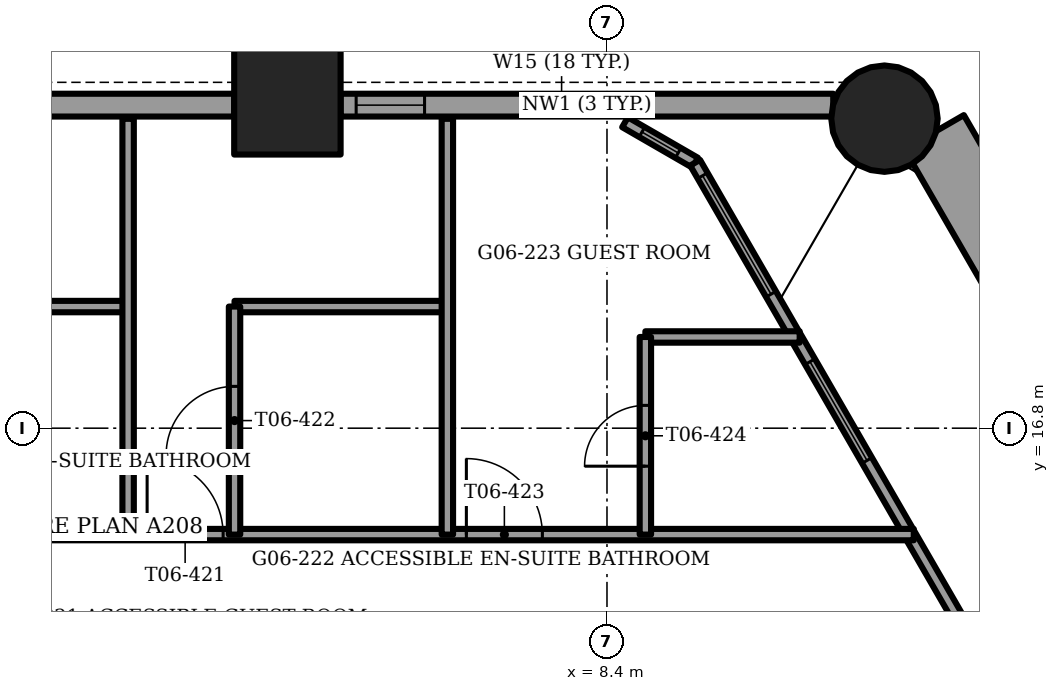
"""IFC4 building model, lengths in metres.
Left out: names, types, materials, properties, quantities, classifications, styles, units other than length and angle.
Written with IfcOpenShell. Run it as: python <this file> out.ifc"""

import sys

from ifc_helpers import new_model, si_unit, direction, frame, frame_2d, origin, origin_2d, place, context, subcontext, project, spatial, rectangle, circle, extrude, element, fill, save


model = new_model("IFC4")
c1 = context("Model", 3, precision=1e-05, world=origin(), true_north=direction((0.0, 1.0)))
c2 = subcontext(c1, "Body", "Model", "MODEL_VIEW")
j1 = project(units=[si_unit("LENGTHUNIT", "METRE"), si_unit("PLANEANGLEUNIT", "RADIAN")], contexts=[c1])
p1 = place(None, origin())
s1 = spatial("IfcSite", under=j1, at=p1, CompositionType="ELEMENT")
p2 = place(p1, origin())
s2 = spatial("IfcBuilding", under=s1, at=p2, CompositionType="ELEMENT")
p3 = place(p2, frame((0.0, 0.0, 28.0)))
s3 = spatial("IfcBuildingStorey", under=s2, at=p3, CompositionType="ELEMENT", Elevation=28.0)
p4 = place(p3, frame((12.051, 20.872, -1.2), z_axis=(0.0, 0.0, 1.0), x_axis=(1.0, 0.0, 0.0)))
e1 = element("IfcColumn", 1, at=p4, inside=s3, PredefinedType="COLUMN", context=c2, shape_type="SweptSolid", body=[
    extrude(circle(Radius=0.7, at=origin_2d()), origin(), (0.0, 0.0, 1.0), 3.75),
])
p5 = place(p3, frame((4.195, 21.1, -1.2), z_axis=(0.0, 0.0, 1.0), x_axis=(1.0, 0.0, 0.0)))
e2 = element("IfcColumn", 2, at=p5, inside=s3, PredefinedType="COLUMN", context=c2, shape_type="SweptSolid", body=[
    extrude(rectangle(XDim=1.4, YDim=1.4, at=origin_2d()), origin(), (0.0, 0.0, 1.0), 3.75),
])
p6 = place(p3, frame((16.057, 14.889, 0.0), z_axis=(0.0, 0.0, 1.0), x_axis=(-0.500005133765, 0.866022439784, 0.0)))
e3 = element("IfcWall", 3, at=p6, inside=s3, PredefinedType="PARAPET", context=c2, shape_type="SweptSolid", body=[
    extrude(rectangle(XDim=6.704, YDim=0.9, at=frame_2d((3.352, 0.0))), origin(), (0.0, 0.0, 1.0), 1.1),
])
p7 = place(p3, frame((11.377, 21.05, 0.0), z_axis=(0.0, 0.0, 1.0), x_axis=(-1.0, 0.0, 0.0)))
e4 = element("IfcWall", 4, at=p7, inside=s3, PredefinedType="SOLIDWALL", context=c2, shape_type="SweptSolid", body=[
    extrude(rectangle(XDim=6.481, YDim=0.3, at=frame_2d((3.241, 0.0))), origin(), (0.0, 0.0, 1.0), 2.55),
])
p8 = place(p7, frame((3.124, 0.0, 0.15)))
e5 = element("IfcOpeningElement", 5, at=p8, cuts=e4, PredefinedType="OPENING", context=c2, shape_type="SweptSolid", body=[
    extrude(rectangle(XDim=0.9, YDim=2.15, at=frame_2d((0.45, 1.075))), frame((0.0, 0.15, 0.0), z_axis=(0.0, -1.0, 0.0), x_axis=(1.0, 0.0, 0.0)), (0.0, 0.0, 1.0), 0.3),
])
p9 = place(p7, frame((5.377, 0.0, 0.15)))
e6 = element("IfcOpeningElement", 6, at=p9, cuts=e4, PredefinedType="OPENING", context=c2, shape_type="SweptSolid", body=[
    extrude(rectangle(XDim=0.9, YDim=2.15, at=frame_2d((0.45, 1.075))), frame((0.0, 0.15, 0.0), z_axis=(0.0, -1.0, 0.0), x_axis=(1.0, 0.0, 0.0)), (0.0, 0.0, 1.0), 0.3),
])
p10 = place(p3, frame((3.495, 21.05, 0.0), z_axis=(0.0, 0.0, 1.0), x_axis=(-1.0, 0.0, 0.0)))
e7 = element("IfcWall", 7, at=p10, inside=s3, PredefinedType="SOLIDWALL", context=c2, shape_type="SweptSolid", body=[
    extrude(rectangle(XDim=6.991, YDim=0.3, at=frame_2d((3.495, 0.0))), origin(), (0.0, 0.0, 1.0), 2.55),
])
p11 = place(p10, frame((3.095, 0.0, 0.15)))
e8 = element("IfcOpeningElement", 8, at=p11, cuts=e7, PredefinedType="OPENING", context=c2, shape_type="SweptSolid", body=[
    extrude(rectangle(XDim=0.9, YDim=2.15, at=frame_2d((0.45, 1.075))), frame((0.0, 0.15, 0.0), z_axis=(0.0, -1.0, 0.0), x_axis=(1.0, 0.0, 0.0)), (0.0, 0.0, 1.0), 0.3),
])
p12 = place(p3, frame((20.968, 0.532, 0.0), z_axis=(0.0, 0.0, 1.0), x_axis=(-0.500000010132, 0.866025397935, 0.0)))
e9 = element("IfcWall", 9, at=p12, inside=s3, PredefinedType="SOLIDWALL", context=c2, shape_type="SweptSolid", body=[
    extrude(rectangle(XDim=22.817, YDim=0.15, at=frame_2d((11.408, 0.0))), origin(), (0.0, 0.0, 1.0), 3.45),
])
p13 = place(p12, frame((5.136, 0.0, 0.15)))
e10 = element("IfcOpeningElement", 10, at=p13, cuts=e9, PredefinedType="OPENING", context=c2, shape_type="SweptSolid", body=[
    extrude(rectangle(XDim=0.9, YDim=2.85, at=frame_2d((0.45, 1.425))), frame((0.0, 0.075, 0.0), z_axis=(0.0, -1.0, 0.0), x_axis=(1.0, 0.0, 0.0)), (0.0, 0.0, 1.0), 0.15),
])
p14 = place(p12, frame((6.123, 0.0, 0.0)))
e11 = element("IfcOpeningElement", 11, at=p14, cuts=e9, PredefinedType="OPENING", context=c2, shape_type="SweptSolid", body=[
    extrude(rectangle(XDim=1.5, YDim=2.4, at=frame_2d((0.75, 1.2))), frame((0.0, 0.075, 0.0), z_axis=(0.0, -1.0, 0.0), x_axis=(1.0, 0.0, 0.0)), (0.0, 0.0, 1.0), 0.15),
])
p15 = place(p12, frame((8.223, 0.0, 0.15)))
e12 = element("IfcOpeningElement", 12, at=p15, cuts=e9, PredefinedType="OPENING", context=c2, shape_type="SweptSolid", body=[
    extrude(rectangle(XDim=0.9, YDim=2.85, at=frame_2d((0.45, 1.425))), frame((0.0, 0.075, 0.0), z_axis=(0.0, -1.0, 0.0), x_axis=(1.0, 0.0, 0.0)), (0.0, 0.0, 1.0), 0.15),
])
p16 = place(p12, frame((10.323, 0.0, 0.15)))
e13 = element("IfcOpeningElement", 13, at=p16, cuts=e9, PredefinedType="OPENING", context=c2, shape_type="SweptSolid", body=[
    extrude(rectangle(XDim=1.5, YDim=2.85, at=frame_2d((0.75, 1.425))), frame((0.0, 0.075, 0.0), z_axis=(0.0, -1.0, 0.0), x_axis=(1.0, 0.0, 0.0)), (0.0, 0.0, 1.0), 0.15),
])
p17 = place(p12, frame((14.764, 0.0, 0.15)))
e14 = element("IfcOpeningElement", 14, at=p17, cuts=e9, PredefinedType="OPENING", context=c2, shape_type="SweptSolid", body=[
    extrude(rectangle(XDim=0.9, YDim=2.85, at=frame_2d((0.45, 1.425))), frame((0.0, 0.075, 0.0), z_axis=(0.0, -1.0, 0.0), x_axis=(1.0, 0.0, 0.0)), (0.0, 0.0, 1.0), 0.15),
])
p18 = place(p12, frame((12.564, 0.0, 0.15)))
e15 = element("IfcOpeningElement", 15, at=p18, cuts=e9, PredefinedType="OPENING", context=c2, shape_type="SweptSolid", body=[
    extrude(rectangle(XDim=1.5, YDim=2.85, at=frame_2d((0.75, 1.425))), frame((0.0, 0.075, 0.0), z_axis=(0.0, -1.0, 0.0), x_axis=(1.0, 0.0, 0.0)), (0.0, 0.0, 1.0), 0.15),
])
p19 = place(p12, frame((18.294, 0.0, 0.15)))
e16 = element("IfcOpeningElement", 16, at=p19, cuts=e9, PredefinedType="OPENING", context=c2, shape_type="SweptSolid", body=[
    extrude(rectangle(XDim=1.5, YDim=2.85, at=frame_2d((0.75, 1.425))), frame((0.0, 0.075, 0.0), z_axis=(0.0, -1.0, 0.0), x_axis=(1.0, 0.0, 0.0)), (0.0, 0.0, 1.0), 0.15),
])
p20 = place(p12, frame((0.993, 0.0, 0.15)))
e17 = element("IfcOpeningElement", 17, at=p20, cuts=e9, PredefinedType="OPENING", context=c2, shape_type="SweptSolid", body=[
    extrude(rectangle(XDim=1.8, YDim=2.73, at=frame_2d((0.9, 1.365))), frame((0.0, 0.075, 0.0), z_axis=(0.0, -1.0, 0.0), x_axis=(1.0, 0.0, 0.0)), (0.0, 0.0, 1.0), 0.15),
])
p21 = place(p12, frame((20.82, 0.0, 0.15)))
e18 = element("IfcOpeningElement", 18, at=p21, cuts=e9, PredefinedType="OPENING", context=c2, shape_type="SweptSolid", body=[
    extrude(rectangle(XDim=1.8, YDim=2.73, at=frame_2d((0.9, 1.365))), frame((0.0, 0.075, 0.0), z_axis=(0.0, -1.0, 0.0), x_axis=(1.0, 0.0, 0.0)), (0.0, 0.0, 1.0), 0.15),
])
p22 = place(p3, frame((9.56, 20.292, 0.0), z_axis=(0.0, 0.0, 1.0), x_axis=(-0.866048165231, 0.499960573946, 0.0)))
e19 = element("IfcWall", 19, at=p22, inside=s3, PredefinedType="SOLIDWALL", context=c2, shape_type="SweptSolid", body=[
    extrude(rectangle(XDim=1.065, YDim=0.15, at=frame_2d((0.532, 0.0))), origin(), (0.0, 0.0, 1.0), 3.45),
])
p23 = place(p22, frame((0.258, 0.0, 0.15)))
e20 = element("IfcOpeningElement", 20, at=p23, cuts=e19, PredefinedType="OPENING", context=c2, shape_type="SweptSolid", body=[
    extrude(rectangle(XDim=0.55, YDim=2.85, at=frame_2d((0.275, 1.425))), frame((0.0, 0.075, 0.0), z_axis=(0.0, -1.0, 0.0), x_axis=(1.0, 0.0, 0.0)), (0.0, 0.0, 1.0), 0.15),
])
p24 = place(p3, frame((-12.436, 15.4, 0.0), z_axis=(0.0, 0.0, 1.0), x_axis=(1.0, 0.0, 0.0)))
e21 = element("IfcWall", 21, at=p24, inside=s3, PredefinedType="PARTITIONING", context=c2, shape_type="SweptSolid", body=[
    extrude(rectangle(XDim=24.872, YDim=0.15, at=frame_2d((12.436, 0.0))), origin(), (0.0, 0.0, 1.0), 3.45),
])
p25 = place(p24, frame((3.538, 0.0, 0.0)))
e22 = element("IfcOpeningElement", 22, at=p25, cuts=e21, PredefinedType="OPENING", context=c2, shape_type="SweptSolid", body=[
    extrude(rectangle(XDim=1.0, YDim=2.1, at=frame_2d((0.5, 1.05))), frame((0.0, 0.075, 0.0), z_axis=(0.0, -1.0, 0.0), x_axis=(1.0, 0.0, 0.0)), (0.0, 0.0, 1.0), 0.15),
])
p26 = place(p24, frame((6.386, 0.0, 0.0)))
e23 = element("IfcOpeningElement", 23, at=p26, cuts=e21, PredefinedType="OPENING", context=c2, shape_type="SweptSolid", body=[
    extrude(rectangle(XDim=1.0, YDim=2.1, at=frame_2d((0.5, 1.05))), frame((0.0, 0.075, 0.0), z_axis=(0.0, -1.0, 0.0), x_axis=(1.0, 0.0, 0.0)), (0.0, 0.0, 1.0), 0.15),
])
p27 = place(p24, frame((10.586, 0.0, 0.0)))
e24 = element("IfcOpeningElement", 24, at=p27, cuts=e21, PredefinedType="OPENING", context=c2, shape_type="SweptSolid", body=[
    extrude(rectangle(XDim=1.0, YDim=2.1, at=frame_2d((0.5, 1.05))), frame((0.0, 0.075, 0.0), z_axis=(0.0, -1.0, 0.0), x_axis=(1.0, 0.0, 0.0)), (0.0, 0.0, 1.0), 0.15),
])
p28 = place(p24, frame((14.786, 0.0, 0.0)))
e25 = element("IfcOpeningElement", 25, at=p28, cuts=e21, PredefinedType="OPENING", context=c2, shape_type="SweptSolid", body=[
    extrude(rectangle(XDim=1.0, YDim=2.1, at=frame_2d((0.5, 1.05))), frame((0.0, 0.075, 0.0), z_axis=(0.0, -1.0, 0.0), x_axis=(1.0, 0.0, 0.0)), (0.0, 0.0, 1.0), 0.15),
])
p29 = place(p24, frame((18.986, 0.0, 0.0)))
e26 = element("IfcOpeningElement", 26, at=p29, cuts=e21, PredefinedType="OPENING", context=c2, shape_type="SweptSolid", body=[
    extrude(rectangle(XDim=1.0, YDim=2.1, at=frame_2d((0.5, 1.05))), frame((0.0, 0.075, 0.0), z_axis=(0.0, -1.0, 0.0), x_axis=(1.0, 0.0, 0.0)), (0.0, 0.0, 1.0), 0.15),
])
p30 = place(p3, frame((8.905, 18.0, 0.0), z_axis=(0.0, 0.0, 1.0), x_axis=(1.0, 0.0, 0.0)))
e27 = element("IfcWall", 27, at=p30, inside=s3, PredefinedType="PARTITIONING", context=c2, shape_type="SweptSolid", body=[
    extrude(rectangle(XDim=2.03, YDim=0.15, at=frame_2d((1.015, 0.0))), origin(), (0.0, 0.0, 1.0), 3.45),
])
for number, where, z_axis, x_axis in (
    (28, (-0.7, 18.4, 0.0), (0.0, 0.0, 1.0), (1.0, 0.0, 0.0)),
    (29, (3.5, 18.4, 0.0), (0.0, 0.0, 1.0), (1.0, 0.0, 0.0)),
):
    element("IfcWall", number, at=place(p3, frame(where, z_axis=z_axis, x_axis=x_axis)), inside=s3, PredefinedType="PARTITIONING", context=c2, shape_type="SweptSolid", body=[
        extrude(rectangle(XDim=2.8, YDim=0.15, at=frame_2d((1.4, 0.0))), origin(), (0.0, 0.0, 1.0), 3.45),
    ])
p31 = place(p3, frame((8.905, 15.4, 0.0), z_axis=(0.0, 0.0, 1.0), x_axis=(0.0, 1.0, 0.0)))
e30 = element("IfcWall", 30, at=p31, inside=s3, PredefinedType="PARTITIONING", context=c2, shape_type="SweptSolid", body=[
    extrude(rectangle(XDim=2.6, YDim=0.15, at=frame_2d((1.3, 0.0))), origin(), (0.0, 0.0, 1.0), 3.45),
])
p32 = place(p31, frame((0.9, 0.0, 0.0)))
e31 = element("IfcOpeningElement", 31, at=p32, cuts=e30, PredefinedType="OPENING", context=c2, shape_type="SweptSolid", body=[
    extrude(rectangle(XDim=0.8, YDim=2.1, at=frame_2d((0.4, 1.05))), frame((0.0, 0.075, 0.0), z_axis=(0.0, -1.0, 0.0), x_axis=(1.0, 0.0, 0.0)), (0.0, 0.0, 1.0), 0.15),
])
p33 = place(p3, frame((6.3, 15.4, 0.0), z_axis=(0.0, 0.0, 1.0), x_axis=(0.0, 1.0, 0.0)))
e32 = element("IfcWall", 32, at=p33, inside=s3, PredefinedType="PARTITIONING", context=c2, shape_type="SweptSolid", body=[
    extrude(rectangle(XDim=5.47, YDim=0.15, at=frame_2d((2.735, 0.0))), origin(), (0.0, 0.0, 1.0), 3.45),
])
p34 = place(p3, frame((3.5, 15.4, 0.0), z_axis=(0.0, 0.0, 1.0), x_axis=(0.0, 1.0, 0.0)))
e33 = element("IfcWall", 33, at=p34, inside=s3, PredefinedType="PARTITIONING", context=c2, shape_type="SweptSolid", body=[
    extrude(rectangle(XDim=3.0, YDim=0.15, at=frame_2d((1.5, 0.0))), origin(), (0.0, 0.0, 1.0), 3.45),
])
p35 = place(p34, frame((1.05, 0.0, 0.0)))
e34 = element("IfcOpeningElement", 34, at=p35, cuts=e33, PredefinedType="OPENING", context=c2, shape_type="SweptSolid", body=[
    extrude(rectangle(XDim=0.9, YDim=2.1, at=frame_2d((0.45, 1.05))), frame((0.0, 0.075, 0.0), z_axis=(0.0, -1.0, 0.0), x_axis=(1.0, 0.0, 0.0)), (0.0, 0.0, 1.0), 0.15),
])
p36 = place(p3, frame((2.1, 15.4, 0.0), z_axis=(0.0, 0.0, 1.0), x_axis=(0.0, 1.0, 0.0)))
e35 = element("IfcWall", 35, at=p36, inside=s3, PredefinedType="PARTITIONING", context=c2, shape_type="SweptSolid", body=[
    extrude(rectangle(XDim=5.47, YDim=0.15, at=frame_2d((2.735, 0.0))), origin(), (0.0, 0.0, 1.0), 3.45),
])
p37 = place(p8, origin())
e36 = element("IfcWindow", 36, at=p37, inside=s3, PartitioningType="SINGLE_PANEL", PredefinedType="WINDOW", context=c2, shape_type="SweptSolid", body=[
    extrude(rectangle(XDim=0.9, YDim=2.15, at=frame_2d((0.45, 1.075))), frame((0.0, 0.03, 0.0), z_axis=(0.0, -1.0, 0.0), x_axis=(1.0, 0.0, 0.0)), (0.0, 0.0, 1.0), 0.06),
])
fill(e5, e36)
p38 = place(p9, origin())
e37 = element("IfcWindow", 37, at=p38, inside=s3, PartitioningType="SINGLE_PANEL", PredefinedType="WINDOW", context=c2, shape_type="SweptSolid", body=[
    extrude(rectangle(XDim=0.9, YDim=2.15, at=frame_2d((0.45, 1.075))), frame((0.0, 0.03, 0.0), z_axis=(0.0, -1.0, 0.0), x_axis=(1.0, 0.0, 0.0)), (0.0, 0.0, 1.0), 0.06),
])
fill(e6, e37)
p39 = place(p19, origin())
e38 = element("IfcWindow", 38, at=p39, inside=s3, PartitioningType="SINGLE_PANEL", PredefinedType="WINDOW", context=c2, shape_type="SweptSolid", body=[
    extrude(rectangle(XDim=1.5, YDim=2.85, at=frame_2d((0.75, 1.425))), frame((0.0, 0.03, 0.0), z_axis=(0.0, -1.0, 0.0), x_axis=(1.0, 0.0, 0.0)), (0.0, 0.0, 1.0), 0.06),
])
fill(e16, e38)
p40 = place(p21, origin())
e39 = element("IfcWindow", 39, at=p40, inside=s3, PartitioningType="SINGLE_PANEL", PredefinedType="WINDOW", context=c2, shape_type="SweptSolid", body=[
    extrude(rectangle(XDim=1.8, YDim=2.73, at=frame_2d((0.9, 1.365))), frame((0.0, 0.03, 0.0), z_axis=(0.0, -1.0, 0.0), x_axis=(1.0, 0.0, 0.0)), (0.0, 0.0, 1.0), 0.06),
])
fill(e18, e39)
p41 = place(p23, origin())
e40 = element("IfcWindow", 40, at=p41, inside=s3, PartitioningType="SINGLE_PANEL", PredefinedType="WINDOW", context=c2, shape_type="SweptSolid", body=[
    extrude(rectangle(XDim=0.55, YDim=2.85, at=frame_2d((0.275, 1.425))), frame((0.0, 0.03, 0.0), z_axis=(0.0, -1.0, 0.0), x_axis=(1.0, 0.0, 0.0)), (0.0, 0.0, 1.0), 0.06),
])
fill(e20, e40)
p42 = place(p28, origin())
e41 = element("IfcDoor", 41, at=p42, inside=s3, OperationType="SINGLE_SWING_LEFT", PredefinedType="DOOR", context=c2, shape_type="SweptSolid", body=[
    extrude(rectangle(XDim=1.0, YDim=2.1, at=frame_2d((0.5, 1.05))), frame((0.0, 0.025, 0.0), z_axis=(0.0, -1.0, 0.0), x_axis=(1.0, 0.0, 0.0)), (0.0, 0.0, 1.0), 0.05),
])
fill(e25, e41)
p43 = place(p35, origin())
e42 = element("IfcDoor", 42, at=p43, inside=s3, OperationType="SINGLE_SWING_LEFT", PredefinedType="DOOR", context=c2, shape_type="SweptSolid", body=[
    extrude(rectangle(XDim=0.9, YDim=2.1, at=frame_2d((0.45, 1.05))), frame((0.0, 0.025, 0.0), z_axis=(0.0, -1.0, 0.0), x_axis=(1.0, 0.0, 0.0)), (0.0, 0.0, 1.0), 0.05),
])
fill(e34, e42)
p44 = place(p29, origin())
e43 = element("IfcDoor", 43, at=p44, inside=s3, OperationType="SINGLE_SWING_LEFT", PredefinedType="DOOR", context=c2, shape_type="SweptSolid", body=[
    extrude(rectangle(XDim=1.0, YDim=2.1, at=frame_2d((0.5, 1.05))), frame((0.0, 0.025, 0.0), z_axis=(0.0, -1.0, 0.0), x_axis=(1.0, 0.0, 0.0)), (0.0, 0.0, 1.0), 0.05),
])
fill(e26, e43)
p45 = place(p32, origin())
e44 = element("IfcDoor", 44, at=p45, inside=s3, OperationType="SINGLE_SWING_LEFT", PredefinedType="DOOR", context=c2, shape_type="SweptSolid", body=[
    extrude(rectangle(XDim=0.8, YDim=2.1, at=frame_2d((0.4, 1.05))), frame((0.0, 0.025, 0.0), z_axis=(0.0, -1.0, 0.0), x_axis=(1.0, 0.0, 0.0)), (0.0, 0.0, 1.0), 0.05),
])
fill(e31, e44)
save(model, sys.argv[1])
